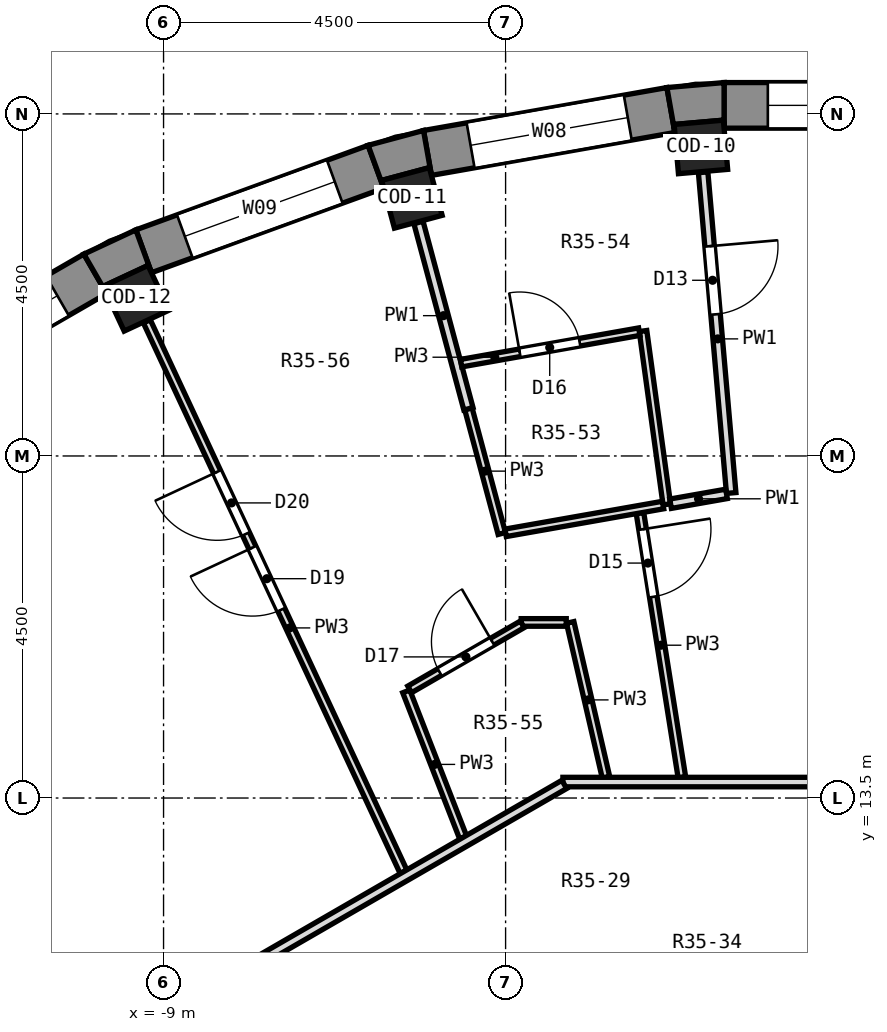
"""IFC4 building model, lengths in metres.
Left out: names, types, materials, properties, quantities, classifications, styles, units other than length and angle.
Written with IfcOpenShell. Run it as: python <this file> out.ifc"""

import sys

from ifc_helpers import new_model, si_unit, direction, frame, frame_2d, origin, origin_2d, place, context, subcontext, project, spatial, polyline, rectangle, outline, extrude, element, fill, save


model = new_model("IFC4")
c1 = context("Model", 3, precision=1e-05, world=origin(), true_north=direction((0.0, 1.0)))
c2 = subcontext(c1, "Body", "Model", "MODEL_VIEW")
j1 = project(units=[si_unit("LENGTHUNIT", "METRE"), si_unit("PLANEANGLEUNIT", "RADIAN")], contexts=[c1])
p1 = place(None, origin())
s1 = spatial("IfcSite", under=j1, at=p1, CompositionType="ELEMENT")
p2 = place(p1, origin())
s2 = spatial("IfcBuilding", under=s1, at=p2, CompositionType="ELEMENT")
p3 = place(p2, frame((0.0, 0.0, 249.5)))
s3 = spatial("IfcBuildingStorey", under=s2, at=p3, CompositionType="ELEMENT", Elevation=249.5)
for number, where, z_axis, x_axis in (
    (1, (-1.93, 22.066, 0.0), (0.0, 0.0, 1.0), (-0.087, 0.996, 0.0)),
    (2, (-5.733, 21.395, 0.0), (0.0, 0.0, 1.0), (-0.259, 0.966, 0.0)),
    (3, (-9.361, 20.075, 0.0), (0.0, 0.0, 1.0), (-0.423, 0.906, 0.0)),
):
    element("IfcColumn", number, at=place(p3, frame(where, z_axis=z_axis, x_axis=x_axis)), inside=s3, PredefinedType="COLUMN", context=c2, shape_type="SweptSolid", body=[
        extrude(rectangle(XDim=0.65, YDim=0.65, at=origin_2d()), origin(), (0.0, 0.0, 1.0), 3.3),
    ])
p4 = place(p3, frame((1.626, 22.613, 0.0), z_axis=(0.0, 0.0, 1.0), x_axis=(-1.0, 0.0, 0.0)))
e4 = element("IfcWall", 4, at=p4, inside=s3, PredefinedType="SOLIDWALL", context=c2, shape_type="SweptSolid", body=[
    extrude(rectangle(XDim=3.251, YDim=0.6, at=frame_2d((1.626, 0.0))), origin(), (0.0, 0.0, 1.0), 2.9),
])
p5 = place(p4, frame((0.576, 0.0, 0.9)))
e5 = element("IfcOpeningElement", 5, at=p5, cuts=e4, PredefinedType="OPENING", context=c2, shape_type="SweptSolid", body=[
    extrude(rectangle(XDim=2.1, YDim=1.8, at=frame_2d((1.05, 0.9))), frame((0.0, 0.312, 0.0), z_axis=(0.0, -1.0, 0.0), x_axis=(1.0, 0.0, 0.0)), (0.0, 0.0, 1.0), 0.624),
])
p6 = place(p3, frame((-2.325, 22.551, 0.0), z_axis=(0.0, 0.0, 1.0), x_axis=(-0.984806225186, -0.173656842178, 0.0)))
e6 = element("IfcWall", 6, at=p6, inside=s3, PredefinedType="SOLIDWALL", context=c2, shape_type="SweptSolid", body=[
    extrude(rectangle(XDim=3.252, YDim=0.6, at=frame_2d((1.626, 0.0))), origin(), (0.0, 0.0, 1.0), 2.9),
])
p7 = place(p6, frame((0.576, 0.0, 0.9)))
e7 = element("IfcOpeningElement", 7, at=p7, cuts=e6, PredefinedType="OPENING", context=c2, shape_type="SweptSolid", body=[
    extrude(rectangle(XDim=2.1, YDim=1.8, at=frame_2d((1.05, 0.9))), frame((0.0, 0.312, 0.0), z_axis=(0.0, -1.0, 0.0), x_axis=(1.0, 0.0, 0.0)), (0.0, 0.0, 1.0), 0.624),
])
p8 = place(p3, frame((-6.206, 21.805, 0.0), z_axis=(0.0, 0.0, 1.0), x_axis=(-0.939679383794, -0.342056509473, 0.0)))
e8 = element("IfcWall", 8, at=p8, inside=s3, PredefinedType="SOLIDWALL", context=c2, shape_type="SweptSolid", body=[
    extrude(rectangle(XDim=3.252, YDim=0.6, at=frame_2d((1.626, 0.0))), origin(), (0.0, 0.0, 1.0), 2.9),
])
p9 = place(p8, frame((0.576, 0.0, 0.9)))
e9 = element("IfcOpeningElement", 9, at=p9, cuts=e8, PredefinedType="OPENING", context=c2, shape_type="SweptSolid", body=[
    extrude(rectangle(XDim=2.1, YDim=1.8, at=frame_2d((1.05, 0.9))), frame((0.0, 0.312, 0.0), z_axis=(0.0, -1.0, 0.0), x_axis=(1.0, 0.0, 0.0)), (0.0, 0.0, 1.0), 0.624),
])
p10 = place(p3, frame((-9.898, 20.396, 0.0), z_axis=(0.0, 0.0, 1.0), x_axis=(-0.866016800201, -0.500014901547, 0.0)))
e10 = element("IfcWall", 10, at=p10, inside=s3, PredefinedType="SOLIDWALL", context=c2, shape_type="SweptSolid", body=[
    extrude(rectangle(XDim=3.252, YDim=0.6, at=frame_2d((1.626, 0.0))), origin(), (0.0, 0.0, 1.0), 2.9),
])
p11 = place(p10, frame((0.576, 0.0, 0.9)))
e11 = element("IfcOpeningElement", 11, at=p11, cuts=e10, PredefinedType="OPENING", context=c2, shape_type="SweptSolid", body=[
    extrude(rectangle(XDim=2.1, YDim=1.8, at=frame_2d((1.05, 0.9))), frame((0.0, 0.312, 0.0), z_axis=(0.0, -1.0, 0.0), x_axis=(1.0, 0.0, 0.0)), (0.0, 0.0, 1.0), 0.624),
])
p12 = place(p3, origin())
e12 = element("IfcWall", 12, at=p12, inside=s3, PredefinedType="SOLIDWALL", context=c2, shape_type="SweptSolid", body=[
    extrude(outline(polyline([(-1.626, 22.913), (-2.378, 22.847), (-2.273, 22.256), (-2.283, 22.361), (-1.635, 22.418), (-1.626, 22.312), (-1.626, 22.913)])), origin(), (0.0, 0.0, 1.0), 2.9),
])
p13 = place(p3, origin())
e13 = element("IfcWall", 13, at=p13, inside=s3, PredefinedType="SOLIDWALL", context=c2, shape_type="SweptSolid", body=[
    extrude(outline(polyline([(-6.309, 22.087), (-6.104, 21.523), (-6.131, 21.625), (-5.503, 21.793), (-5.476, 21.691), (-5.58, 22.282), (-6.309, 22.087)])), origin(), (0.0, 0.0, 1.0), 2.9),
])
p14 = place(p3, origin())
e14 = element("IfcWall", 14, at=p14, inside=s3, PredefinedType="SOLIDWALL", context=c2, shape_type="SweptSolid", body=[
    extrude(outline(polyline([(-9.364, 20.975), (-10.048, 20.656), (-9.748, 20.136), (-9.793, 20.232), (-9.204, 20.507), (-9.159, 20.411), (-9.364, 20.975)])), origin(), (0.0, 0.0, 1.0), 2.9),
])
p15 = place(p3, frame((-1.901, 21.732, 0.0), z_axis=(0.0, 0.0, 1.0), x_axis=(0.087219152914, -0.996189148387, 0.0)))
e15 = element("IfcWall", 15, at=p15, inside=s3, PredefinedType="PARTITIONING", context=c2, shape_type="SweptSolid", body=[
    extrude(rectangle(XDim=4.235, YDim=0.125, at=frame_2d((2.118, 0.0))), origin(), (0.0, 0.0, 1.0), 2.9),
])
p16 = place(p15, frame((0.976, 0.0, 0.0)))
e16 = element("IfcOpeningElement", 16, at=p16, cuts=e15, PredefinedType="OPENING", context=c2, shape_type="SweptSolid", body=[
    extrude(rectangle(XDim=0.9, YDim=2.1, at=frame_2d((0.45, 1.05))), frame((0.0, 0.074, 0.0), z_axis=(0.0, -1.0, 0.0), x_axis=(1.0, 0.0, 0.0)), (0.0, 0.0, 1.0), 0.149),
])
p17 = place(p3, frame((-2.692, 19.644, 0.0), z_axis=(0.0, 0.0, 1.0), x_axis=(0.135941246579, -0.990716900774, 0.0)))
e17 = element("IfcWall", 17, at=p17, inside=s3, PredefinedType="PARTITIONING", context=c2, shape_type="SweptSolid", body=[
    extrude(rectangle(XDim=2.302, YDim=0.1, at=frame_2d((1.151, 0.0))), origin(), (0.0, 0.0, 1.0), 2.9),
])
p18 = place(p3, frame((-2.732, 17.25, 0.0), z_axis=(0.0, 0.0, 1.0), x_axis=(0.156624768699, -0.987658180663, 0.0)))
e18 = element("IfcWall", 18, at=p18, inside=s3, PredefinedType="PARTITIONING", context=c2, shape_type="SweptSolid", body=[
    extrude(rectangle(XDim=3.521, YDim=0.1, at=frame_2d((1.761, 0.0))), origin(), (0.0, 0.0, 1.0), 2.9),
])
p19 = place(p18, frame((0.217, 0.0, 0.0)))
e19 = element("IfcOpeningElement", 19, at=p19, cuts=e18, PredefinedType="OPENING", context=c2, shape_type="SweptSolid", body=[
    extrude(rectangle(XDim=0.9, YDim=2.1, at=frame_2d((0.45, 1.05))), frame((0.0, 0.062, 0.0), z_axis=(0.0, -1.0, 0.0), x_axis=(1.0, 0.0, 0.0)), (0.0, 0.0, 1.0), 0.124),
])
p20 = place(p3, frame((-3.65, 15.81, 0.0), z_axis=(0.0, 0.0, 1.0), x_axis=(0.22503842629, -0.974349889256, 0.0)))
e20 = element("IfcWall", 20, at=p20, inside=s3, PredefinedType="PARTITIONING", context=c2, shape_type="SweptSolid", body=[
    extrude(rectangle(XDim=2.093, YDim=0.1, at=frame_2d((1.046, 0.0))), origin(), (0.0, 0.0, 1.0), 2.9),
])
p21 = place(p3, frame((-4.989, 18.621, 0.0), z_axis=(0.0, 0.0, 1.0), x_axis=(0.258601958208, -0.965983968403, 0.0)))
e21 = element("IfcWall", 21, at=p21, inside=s3, PredefinedType="PARTITIONING", context=c2, shape_type="SweptSolid", body=[
    extrude(rectangle(XDim=1.698, YDim=0.1, at=frame_2d((0.849, 0.0))), origin(), (0.0, 0.0, 1.0), 2.9),
])
p22 = place(p3, frame((-5.646, 21.072, 0.0), z_axis=(0.0, 0.0, 1.0), x_axis=(0.258914025253, -0.965900371429, 0.0)))
e22 = element("IfcWall", 22, at=p22, inside=s3, PredefinedType="PARTITIONING", context=c2, shape_type="SweptSolid", body=[
    extrude(rectangle(XDim=2.537, YDim=0.125, at=frame_2d((1.269, 0.0))), origin(), (0.0, 0.0, 1.0), 2.9),
])
p23 = place(p3, frame((-5.807, 14.903, 0.0), z_axis=(0.0, 0.0, 1.0), x_axis=(0.362800505058, -0.931866832509, 0.0)))
e23 = element("IfcWall", 23, at=p23, inside=s3, PredefinedType="PARTITIONING", context=c2, shape_type="SweptSolid", body=[
    extrude(rectangle(XDim=2.062, YDim=0.1, at=frame_2d((1.031, 0.0))), origin(), (0.0, 0.0, 1.0), 2.9),
])
p24 = place(p3, frame((-9.22, 19.771, 0.0), z_axis=(0.0, 0.0, 1.0), x_axis=(0.422639558445, -0.906297855916, 0.0)))
e24 = element("IfcWall", 24, at=p24, inside=s3, PredefinedType="PARTITIONING", context=c2, shape_type="SweptSolid", body=[
    extrude(rectangle(XDim=7.99, YDim=0.1, at=frame_2d((3.995, 0.0))), origin(), (0.0, 0.0, 1.0), 2.9),
])
p25 = place(p24, frame((3.285, 0.0, 0.0)))
e25 = element("IfcOpeningElement", 25, at=p25, cuts=e24, PredefinedType="OPENING", context=c2, shape_type="SweptSolid", body=[
    extrude(rectangle(XDim=0.9, YDim=2.1, at=frame_2d((0.45, 1.05))), frame((0.0, 0.062, 0.0), z_axis=(0.0, -1.0, 0.0), x_axis=(1.0, 0.0, 0.0)), (0.0, 0.0, 1.0), 0.124),
])
p26 = place(p24, frame((2.186, 0.0, 0.0)))
e26 = element("IfcOpeningElement", 26, at=p26, cuts=e24, PredefinedType="OPENING", context=c2, shape_type="SweptSolid", body=[
    extrude(rectangle(XDim=0.9, YDim=2.1, at=frame_2d((0.45, 1.05))), frame((0.0, 0.062, 0.0), z_axis=(0.0, -1.0, 0.0), x_axis=(1.0, 0.0, 0.0)), (0.0, 0.0, 1.0), 0.124),
])
p27 = place(p3, frame((-12.474, 12.474, 0.0), z_axis=(0.0, 0.0, 1.0), x_axis=(0.707106781187, -0.707106781187, 0.0)))
e27 = element("IfcWall", 27, at=p27, inside=s3, PredefinedType="PARTITIONING", context=c2, shape_type="SweptSolid", body=[
    extrude(rectangle(XDim=3.448, YDim=0.125, at=frame_2d((1.724, 0.0))), origin(), (0.0, 0.0, 1.0), 2.9),
])
p28 = place(p3, frame((-3.746, 13.71, 0.0), z_axis=(0.0, 0.0, 1.0), x_axis=(1.0, 0.0, 0.0)))
e28 = element("IfcWall", 28, at=p28, inside=s3, PredefinedType="PARTITIONING", context=c2, shape_type="SweptSolid", body=[
    extrude(rectangle(XDim=7.357, YDim=0.125, at=frame_2d((3.678, 0.0))), origin(), (0.0, 0.0, 1.0), 2.9),
])
p29 = place(p3, frame((-4.295, 15.81, 0.0), z_axis=(0.0, 0.0, 1.0), x_axis=(1.0, 0.0, 0.0)))
e29 = element("IfcWall", 29, at=p29, inside=s3, PredefinedType="PARTITIONING", context=c2, shape_type="SweptSolid", body=[
    extrude(rectangle(XDim=0.593, YDim=0.1, at=frame_2d((0.296, 0.0))), origin(), (0.0, 0.0, 1.0), 2.9),
])
p30 = place(p3, frame((-4.5, 16.989, 0.0), z_axis=(0.0, 0.0, 1.0), x_axis=(0.984790568505, 0.173745607667, 0.0)))
e30 = element("IfcWall", 30, at=p30, inside=s3, PredefinedType="PARTITIONING", context=c2, shape_type="SweptSolid", body=[
    extrude(rectangle(XDim=2.104, YDim=0.1, at=frame_2d((1.052, 0.0))), origin(), (0.0, 0.0, 1.0), 2.9),
])
p31 = place(p3, frame((-2.33, 17.372, 0.0), z_axis=(0.0, 0.0, 1.0), x_axis=(0.984852515296, 0.173394126532, 0.0)))
e31 = element("IfcWall", 31, at=p31, inside=s3, PredefinedType="PARTITIONING", context=c2, shape_type="SweptSolid", body=[
    extrude(rectangle(XDim=0.748, YDim=0.125, at=frame_2d((0.374, 0.0))), origin(), (0.0, 0.0, 1.0), 2.9),
])
p32 = place(p3, frame((-5.085, 19.221, 0.0), z_axis=(0.0, 0.0, 1.0), x_axis=(0.984739131799, 0.174036899257, 0.0)))
e32 = element("IfcWall", 32, at=p32, inside=s3, PredefinedType="PARTITIONING", context=c2, shape_type="SweptSolid", body=[
    extrude(rectangle(XDim=2.381, YDim=0.1, at=frame_2d((1.19, 0.0))), origin(), (0.0, 0.0, 1.0), 2.9),
])
p33 = place(p32, frame((0.784, 0.0, 0.0)))
e33 = element("IfcOpeningElement", 33, at=p33, cuts=e32, PredefinedType="OPENING", context=c2, shape_type="SweptSolid", body=[
    extrude(rectangle(XDim=0.8, YDim=2.1, at=frame_2d((0.4, 1.05))), frame((0.0, 0.062, 0.0), z_axis=(0.0, -1.0, 0.0), x_axis=(1.0, 0.0, 0.0)), (0.0, 0.0, 1.0), 0.124),
])
p34 = place(p3, frame((-9.982, 10.067, 0.0), z_axis=(0.0, 0.0, 1.0), x_axis=(0.865972766561, 0.500091159265, 0.0)))
e34 = element("IfcWall", 34, at=p34, inside=s3, PredefinedType="PARTITIONING", context=c2, shape_type="SweptSolid", body=[
    extrude(rectangle(XDim=7.222, YDim=0.125, at=frame_2d((3.611, 0.0))), origin(), (0.0, 0.0, 1.0), 2.9),
])
p35 = place(p3, frame((-5.762, 14.929, 0.0), z_axis=(0.0, 0.0, 1.0), x_axis=(0.865924135104, 0.500175361493, 0.0)))
e35 = element("IfcWall", 35, at=p35, inside=s3, PredefinedType="PARTITIONING", context=c2, shape_type="SweptSolid", body=[
    extrude(rectangle(XDim=1.711, YDim=0.1, at=frame_2d((0.855, 0.0))), origin(), (0.0, 0.0, 1.0), 2.9),
])
p36 = place(p35, frame((0.454, 0.0, 0.0)))
e36 = element("IfcOpeningElement", 36, at=p36, cuts=e35, PredefinedType="OPENING", context=c2, shape_type="SweptSolid", body=[
    extrude(rectangle(XDim=0.8, YDim=2.1, at=frame_2d((0.4, 1.05))), frame((0.0, 0.062, 0.0), z_axis=(0.0, -1.0, 0.0), x_axis=(1.0, 0.0, 0.0)), (0.0, 0.0, 1.0), 0.124),
])
p37 = place(p5, origin())
e37 = element("IfcWindow", 37, at=p37, inside=s3, PartitioningType="SINGLE_PANEL", PredefinedType="WINDOW", context=c2, shape_type="SweptSolid", body=[
    extrude(rectangle(XDim=2.1, YDim=1.8, at=frame_2d((1.05, 0.9))), frame((0.0, 0.18, 0.0), z_axis=(0.0, -1.0, 0.0), x_axis=(1.0, 0.0, 0.0)), (0.0, 0.0, 1.0), 0.06),
])
fill(e5, e37)
p38 = place(p7, origin())
e38 = element("IfcWindow", 38, at=p38, inside=s3, PartitioningType="SINGLE_PANEL", PredefinedType="WINDOW", context=c2, shape_type="SweptSolid", body=[
    extrude(rectangle(XDim=2.1, YDim=1.8, at=frame_2d((1.05, 0.9))), frame((0.0, 0.18, 0.0), z_axis=(0.0, -1.0, 0.0), x_axis=(1.0, 0.0, 0.0)), (0.0, 0.0, 1.0), 0.06),
])
fill(e7, e38)
p39 = place(p9, origin())
e39 = element("IfcWindow", 39, at=p39, inside=s3, PartitioningType="SINGLE_PANEL", PredefinedType="WINDOW", context=c2, shape_type="SweptSolid", body=[
    extrude(rectangle(XDim=2.1, YDim=1.8, at=frame_2d((1.05, 0.9))), frame((0.0, 0.18, 0.0), z_axis=(0.0, -1.0, 0.0), x_axis=(1.0, 0.0, 0.0)), (0.0, 0.0, 1.0), 0.06),
])
fill(e9, e39)
p40 = place(p11, origin())
e40 = element("IfcWindow", 40, at=p40, inside=s3, PartitioningType="SINGLE_PANEL", PredefinedType="WINDOW", context=c2, shape_type="SweptSolid", body=[
    extrude(rectangle(XDim=2.1, YDim=1.8, at=frame_2d((1.05, 0.9))), frame((0.0, 0.18, 0.0), z_axis=(0.0, -1.0, 0.0), x_axis=(1.0, 0.0, 0.0)), (0.0, 0.0, 1.0), 0.06),
])
fill(e11, e40)
p41 = place(p16, origin())
e41 = element("IfcDoor", 41, at=p41, inside=s3, OperationType="SINGLE_SWING_LEFT", PredefinedType="DOOR", context=c2, shape_type="SweptSolid", body=[
    extrude(rectangle(XDim=0.9, YDim=2.1, at=frame_2d((0.45, 1.05))), frame((0.0, 0.025, 0.0), z_axis=(0.0, -1.0, 0.0), x_axis=(1.0, 0.0, 0.0)), (0.0, 0.0, 1.0), 0.05),
])
fill(e16, e41)
p42 = place(p19, origin())
e42 = element("IfcDoor", 42, at=p42, inside=s3, OperationType="SINGLE_SWING_LEFT", PredefinedType="DOOR", context=c2, shape_type="SweptSolid", body=[
    extrude(rectangle(XDim=0.9, YDim=2.1, at=frame_2d((0.45, 1.05))), frame((0.0, 0.025, 0.0), z_axis=(0.0, -1.0, 0.0), x_axis=(1.0, 0.0, 0.0)), (0.0, 0.0, 1.0), 0.05),
])
fill(e19, e42)
p43 = place(p33, origin())
e43 = element("IfcDoor", 43, at=p43, inside=s3, OperationType="SINGLE_SWING_LEFT", PredefinedType="DOOR", context=c2, shape_type="SweptSolid", body=[
    extrude(rectangle(XDim=0.8, YDim=2.1, at=frame_2d((0.4, 1.05))), frame((0.0, 0.025, 0.0), z_axis=(0.0, -1.0, 0.0), x_axis=(1.0, 0.0, 0.0)), (0.0, 0.0, 1.0), 0.05),
])
fill(e33, e43)
p44 = place(p36, origin())
e44 = element("IfcDoor", 44, at=p44, inside=s3, OperationType="SINGLE_SWING_RIGHT", PredefinedType="DOOR", context=c2, shape_type="SweptSolid", body=[
    extrude(rectangle(XDim=0.8, YDim=2.1, at=frame_2d((0.4, 1.05))), frame((0.0, 0.025, 0.0), z_axis=(0.0, -1.0, 0.0), x_axis=(1.0, 0.0, 0.0)), (0.0, 0.0, 1.0), 0.05),
])
fill(e36, e44)
p45 = place(p25, frame((0.9, 0.0, 0.0), z_axis=(0.0, 0.0, 1.0), x_axis=(-1.0, 0.0, 0.0)))
e45 = element("IfcDoor", 45, at=p45, inside=s3, OperationType="SINGLE_SWING_RIGHT", PredefinedType="DOOR", context=c2, shape_type="SweptSolid", body=[
    extrude(rectangle(XDim=0.9, YDim=2.1, at=frame_2d((0.45, 1.05))), frame((0.0, 0.025, 0.0), z_axis=(0.0, -1.0, 0.0), x_axis=(1.0, 0.0, 0.0)), (0.0, 0.0, 1.0), 0.05),
])
fill(e25, e45)
p46 = place(p26, frame((0.9, 0.0, 0.0), z_axis=(0.0, 0.0, 1.0), x_axis=(-1.0, 0.0, 0.0)))
e46 = element("IfcDoor", 46, at=p46, inside=s3, OperationType="SINGLE_SWING_RIGHT", PredefinedType="DOOR", context=c2, shape_type="SweptSolid", body=[
    extrude(rectangle(XDim=0.9, YDim=2.1, at=frame_2d((0.45, 1.05))), frame((0.0, 0.025, 0.0), z_axis=(0.0, -1.0, 0.0), x_axis=(1.0, 0.0, 0.0)), (0.0, 0.0, 1.0), 0.05),
])
fill(e26, e46)
save(model, sys.argv[1])
